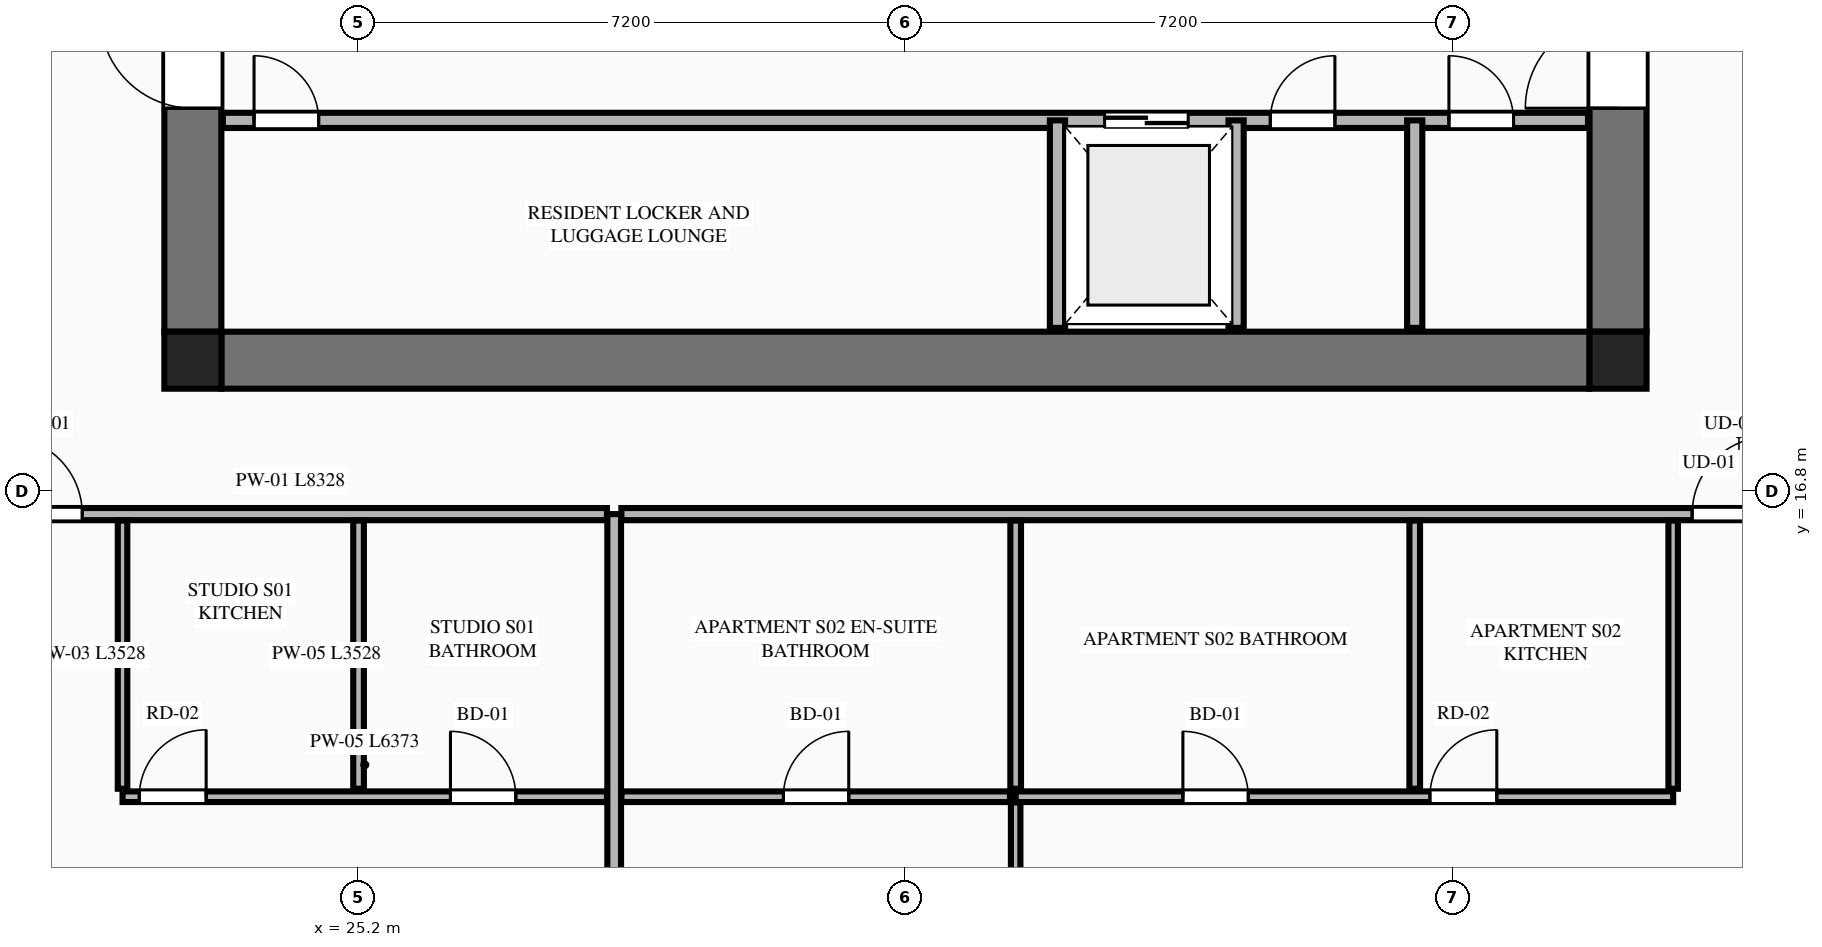
"""IFC4 building model, lengths in metres.
Left out: names, types, materials, properties, quantities, classifications, styles, units other than length and angle.
Written with IfcOpenShell. Run it as: python <this file> out.ifc"""

import sys

from ifc_helpers import new_model, si_unit, direction, frame, frame_2d, origin, origin_2d, place, context, subcontext, project, spatial, rectangle, extrude, element, fill, save


model = new_model("IFC4")
c1 = context("Model", 3, precision=1e-05, world=origin(), true_north=direction((0.0, 1.0)))
c2 = subcontext(c1, "Body", "Model", "MODEL_VIEW")
j1 = project(units=[si_unit("LENGTHUNIT", "METRE"), si_unit("PLANEANGLEUNIT", "RADIAN")], contexts=[c1])
p1 = place(None, origin())
s1 = spatial("IfcSite", under=j1, at=p1, CompositionType="ELEMENT")
p2 = place(p1, origin())
s2 = spatial("IfcBuilding", under=s1, at=p2, CompositionType="ELEMENT")
p3 = place(p2, frame((0.0, 0.0, 133.9)))
s3 = spatial("IfcBuildingStorey", under=s2, at=p3, CompositionType="ELEMENT", Elevation=133.9)
for number, where, z_axis, x_axis in (
    (1, (23.025, 18.525, 0.0), (0.0, 0.0, 1.0), (1.0, 0.0, 0.0)),
    (2, (41.775, 18.525, 0.0), (0.0, 0.0, 1.0), (1.0, 0.0, 0.0)),
):
    element("IfcColumn", number, at=place(p3, frame(where, z_axis=z_axis, x_axis=x_axis)), inside=s3, PredefinedType="COLUMN", context=c2, shape_type="SweptSolid", body=[
        extrude(rectangle(XDim=0.75, YDim=0.75, at=origin_2d()), origin(), (0.0, 0.0, 1.0), 3.55),
    ])
p4 = place(p3, frame((23.4, 18.525, 0.0), z_axis=(0.0, 0.0, 1.0), x_axis=(1.0, 0.0, 0.0)))
e3 = element("IfcWall", 3, at=p4, inside=s3, PredefinedType="SHEAR", context=c2, shape_type="SweptSolid", body=[
    extrude(rectangle(XDim=18.0, YDim=0.75, at=frame_2d((9.0, 0.0))), origin(), (0.0, 0.0, 1.0), 3.34),
])
p5 = place(p3, frame((23.025, 18.9, 0.0), z_axis=(0.0, 0.0, 1.0), x_axis=(0.0, 1.0, 0.0)))
e4 = element("IfcWall", 4, at=p5, inside=s3, PredefinedType="SHEAR", context=c2, shape_type="SweptSolid", body=[
    extrude(rectangle(XDim=14.0, YDim=0.75, at=frame_2d((7.0, 0.0))), origin(), (0.0, 0.0, 1.0), 3.34),
])
p6 = place(p5, frame((2.94, 0.0, 0.0)))
e5 = element("IfcOpeningElement", 5, at=p6, cuts=e4, PredefinedType="OPENING", context=c2, shape_type="SweptSolid", body=[
    extrude(rectangle(XDim=1.22, YDim=2.25, at=frame_2d((0.61, 1.125))), frame((0.0, 0.385, 0.0), z_axis=(0.0, -1.0, 0.0), x_axis=(1.0, 0.0, 0.0)), (0.0, 0.0, 1.0), 0.77),
])
p7 = place(p3, frame((41.775, 18.9, 0.0), z_axis=(0.0, 0.0, 1.0), x_axis=(0.0, 1.0, 0.0)))
e6 = element("IfcWall", 6, at=p7, inside=s3, PredefinedType="SHEAR", context=c2, shape_type="SweptSolid", body=[
    extrude(rectangle(XDim=14.0, YDim=0.75, at=frame_2d((7.0, 0.0))), origin(), (0.0, 0.0, 1.0), 3.34),
])
p8 = place(p7, frame((2.94, 0.0, 0.0)))
e7 = element("IfcOpeningElement", 7, at=p8, cuts=e6, PredefinedType="OPENING", context=c2, shape_type="SweptSolid", body=[
    extrude(rectangle(XDim=1.22, YDim=2.25, at=frame_2d((0.61, 1.125))), frame((0.0, 0.385, 0.0), z_axis=(0.0, -1.0, 0.0), x_axis=(1.0, 0.0, 0.0)), (0.0, 0.0, 1.0), 0.77),
])
p9 = place(p3, frame((23.42, 21.68, 0.0), z_axis=(0.0, 0.0, 1.0), x_axis=(1.0, 0.0, 0.0)))
e8 = element("IfcWall", 8, at=p9, inside=s3, PredefinedType="PLUMBINGWALL", context=c2, shape_type="SweptSolid", body=[
    extrude(rectangle(XDim=17.96, YDim=0.2, at=frame_2d((8.98, 0.0))), origin(), (0.0, 0.0, 1.0), 3.34),
])
p10 = place(p9, frame((11.6, 0.0, 0.0)))
e9 = element("IfcOpeningElement", 9, at=p10, cuts=e8, PredefinedType="OPENING", context=c2, shape_type="SweptSolid", body=[
    extrude(rectangle(XDim=1.1, YDim=2.2, at=frame_2d((0.55, 1.1))), frame((0.0, 0.11, 0.0), z_axis=(0.0, -1.0, 0.0), x_axis=(1.0, 0.0, 0.0)), (0.0, 0.0, 1.0), 0.22),
])
p11 = place(p9, frame((0.41, 0.0, 0.0)))
e10 = element("IfcOpeningElement", 10, at=p11, cuts=e8, PredefinedType="OPENING", context=c2, shape_type="SweptSolid", body=[
    extrude(rectangle(XDim=0.85, YDim=2.05, at=frame_2d((0.425, 1.025))), frame((0.0, 0.11, 0.0), z_axis=(0.0, -1.0, 0.0), x_axis=(1.0, 0.0, 0.0)), (0.0, 0.0, 1.0), 0.22),
])
p12 = place(p9, frame((13.78, 0.0, 0.0)))
e11 = element("IfcOpeningElement", 11, at=p12, cuts=e8, PredefinedType="OPENING", context=c2, shape_type="SweptSolid", body=[
    extrude(rectangle(XDim=0.85, YDim=2.05, at=frame_2d((0.425, 1.025))), frame((0.0, 0.11, 0.0), z_axis=(0.0, -1.0, 0.0), x_axis=(1.0, 0.0, 0.0)), (0.0, 0.0, 1.0), 0.22),
])
p13 = place(p9, frame((16.13, 0.0, 0.0)))
e12 = element("IfcOpeningElement", 12, at=p13, cuts=e8, PredefinedType="OPENING", context=c2, shape_type="SweptSolid", body=[
    extrude(rectangle(XDim=0.85, YDim=2.05, at=frame_2d((0.425, 1.025))), frame((0.0, 0.11, 0.0), z_axis=(0.0, -1.0, 0.0), x_axis=(1.0, 0.0, 0.0)), (0.0, 0.0, 1.0), 0.22),
])
for number, where, z_axis, x_axis in (
    (13, (34.4, 18.95, 0.0), (0.0, 0.0, 1.0), (0.0, 1.0, 0.0)),
    (14, (36.75, 18.95, 0.0), (0.0, 0.0, 1.0), (0.0, 1.0, 0.0)),
    (15, (39.1, 18.95, 0.0), (0.0, 0.0, 1.0), (0.0, 1.0, 0.0)),
):
    element("IfcWall", number, at=place(p3, frame(where, z_axis=z_axis, x_axis=x_axis)), inside=s3, PredefinedType="PLUMBINGWALL", context=c2, shape_type="SweptSolid", body=[
        extrude(rectangle(XDim=2.73, YDim=0.2, at=frame_2d((1.365, 0.0))), origin(), (0.0, 0.0, 1.0), 3.34),
    ])
p14 = place(p3, frame((28.568, 4.105, 0.0), z_axis=(0.0, 0.0, 1.0), x_axis=(0.0, 1.0, 0.0)))
e16 = element("IfcWall", 16, at=p14, inside=s3, PredefinedType="PARTITIONING", context=c2, shape_type="SweptSolid", body=[
    extrude(rectangle(XDim=12.395, YDim=0.18, at=frame_2d((6.198, 0.0))), origin(), (0.0, 0.0, 1.0), 2.722),
])
p15 = place(p3, frame((20.145, 16.5, 0.0), z_axis=(0.0, 0.0, 1.0), x_axis=(1.0, 0.0, 0.0)))
e17 = element("IfcWall", 17, at=p15, inside=s3, PredefinedType="PARTITIONING", context=c2, shape_type="SweptSolid", body=[
    extrude(rectangle(XDim=8.328, YDim=0.16, at=frame_2d((4.164, 0.0))), origin(), (0.0, 0.0, 1.0), 3.34),
])
p16 = place(p15, frame((0.405, 0.0, 0.0)))
e18 = element("IfcOpeningElement", 18, at=p16, cuts=e17, PredefinedType="OPENING", context=c2, shape_type="SweptSolid", body=[
    extrude(rectangle(XDim=1.02, YDim=2.25, at=frame_2d((0.51, 1.125))), frame((0.0, 0.09, 0.0), z_axis=(0.0, -1.0, 0.0), x_axis=(1.0, 0.0, 0.0)), (0.0, 0.0, 1.0), 0.18),
])
p17 = place(p3, frame((22.1, 12.887, 0.0), z_axis=(0.0, 0.0, 1.0), x_axis=(0.0, 1.0, 0.0)))
e19 = element("IfcWall", 19, at=p17, inside=s3, PredefinedType="PARTITIONING", context=c2, shape_type="SweptSolid", body=[
    extrude(rectangle(XDim=3.528, YDim=0.125, at=frame_2d((1.764, 0.0))), origin(), (0.0, 0.0, 1.0), 2.722),
])
p18 = place(p3, frame((22.1, 12.782, 0.0), z_axis=(0.0, 0.0, 1.0), x_axis=(1.0, 0.0, 0.0)))
e20 = element("IfcWall", 20, at=p18, inside=s3, PredefinedType="PLUMBINGWALL", context=c2, shape_type="SweptSolid", body=[
    extrude(rectangle(XDim=6.373, YDim=0.14, at=frame_2d((3.187, 0.0))), origin(), (0.0, 0.0, 1.0), 3.34),
])
p19 = place(p18, frame((4.314, 0.0, 0.0)))
e21 = element("IfcOpeningElement", 21, at=p19, cuts=e20, PredefinedType="OPENING", context=c2, shape_type="SweptSolid", body=[
    extrude(rectangle(XDim=0.86, YDim=2.1, at=frame_2d((0.43, 1.05))), frame((0.0, 0.08, 0.0), z_axis=(0.0, -1.0, 0.0), x_axis=(1.0, 0.0, 0.0)), (0.0, 0.0, 1.0), 0.16),
])
p20 = place(p18, frame((0.22, 0.0, 0.0)))
e22 = element("IfcOpeningElement", 22, at=p20, cuts=e20, PredefinedType="OPENING", context=c2, shape_type="SweptSolid", body=[
    extrude(rectangle(XDim=0.88, YDim=2.15, at=frame_2d((0.44, 1.075))), frame((0.0, 0.08, 0.0), z_axis=(0.0, -1.0, 0.0), x_axis=(1.0, 0.0, 0.0)), (0.0, 0.0, 1.0), 0.16),
])
p21 = place(p3, frame((25.205, 12.887, 0.0), z_axis=(0.0, 0.0, 1.0), x_axis=(0.0, 1.0, 0.0)))
e23 = element("IfcWall", 23, at=p21, inside=s3, PredefinedType="PLUMBINGWALL", context=c2, shape_type="SweptSolid", body=[
    extrude(rectangle(XDim=3.528, YDim=0.14, at=frame_2d((1.764, 0.0))), origin(), (0.0, 0.0, 1.0), 3.34),
])
p22 = place(p3, frame((28.663, 16.5, 0.0), z_axis=(0.0, 0.0, 1.0), x_axis=(1.0, 0.0, 0.0)))
e24 = element("IfcWall", 24, at=p22, inside=s3, PredefinedType="PARTITIONING", context=c2, shape_type="SweptSolid", body=[
    extrude(rectangle(XDim=15.992, YDim=0.16, at=frame_2d((7.996, 0.0))), origin(), (0.0, 0.0, 1.0), 3.34),
])
p23 = place(p22, frame((14.087, 0.0, 0.0)))
e25 = element("IfcOpeningElement", 25, at=p23, cuts=e24, PredefinedType="OPENING", context=c2, shape_type="SweptSolid", body=[
    extrude(rectangle(XDim=1.02, YDim=2.25, at=frame_2d((0.51, 1.125))), frame((0.0, 0.09, 0.0), z_axis=(0.0, -1.0, 0.0), x_axis=(1.0, 0.0, 0.0)), (0.0, 0.0, 1.0), 0.18),
])
p24 = place(p3, frame((42.5, 12.887, 0.0), z_axis=(0.0, 0.0, 1.0), x_axis=(0.0, 1.0, 0.0)))
e26 = element("IfcWall", 26, at=p24, inside=s3, PredefinedType="PARTITIONING", context=c2, shape_type="SweptSolid", body=[
    extrude(rectangle(XDim=3.528, YDim=0.125, at=frame_2d((1.764, 0.0))), origin(), (0.0, 0.0, 1.0), 2.722),
])
p25 = place(p3, frame((33.85, 12.782, 0.0), z_axis=(0.0, 0.0, 1.0), x_axis=(1.0, 0.0, 0.0)))
e27 = element("IfcWall", 27, at=p25, inside=s3, PredefinedType="PLUMBINGWALL", context=c2, shape_type="SweptSolid", body=[
    extrude(rectangle(XDim=8.65, YDim=0.14, at=frame_2d((4.325, 0.0))), origin(), (0.0, 0.0, 1.0), 3.34),
])
p26 = place(p25, frame((2.2, 0.0, 0.0)))
e28 = element("IfcOpeningElement", 28, at=p26, cuts=e27, PredefinedType="OPENING", context=c2, shape_type="SweptSolid", body=[
    extrude(rectangle(XDim=0.86, YDim=2.1, at=frame_2d((0.43, 1.05))), frame((0.0, 0.08, 0.0), z_axis=(0.0, -1.0, 0.0), x_axis=(1.0, 0.0, 0.0)), (0.0, 0.0, 1.0), 0.16),
])
p27 = place(p25, frame((5.45, 0.0, 0.0)))
e29 = element("IfcOpeningElement", 29, at=p27, cuts=e27, PredefinedType="OPENING", context=c2, shape_type="SweptSolid", body=[
    extrude(rectangle(XDim=0.88, YDim=2.15, at=frame_2d((0.44, 1.075))), frame((0.0, 0.08, 0.0), z_axis=(0.0, -1.0, 0.0), x_axis=(1.0, 0.0, 0.0)), (0.0, 0.0, 1.0), 0.16),
])
p28 = place(p3, frame((28.663, 12.782, 0.0), z_axis=(0.0, 0.0, 1.0), x_axis=(1.0, 0.0, 0.0)))
e30 = element("IfcWall", 30, at=p28, inside=s3, PredefinedType="PLUMBINGWALL", context=c2, shape_type="SweptSolid", body=[
    extrude(rectangle(XDim=5.112, YDim=0.14, at=frame_2d((2.556, 0.0))), origin(), (0.0, 0.0, 1.0), 3.34),
])
p29 = place(p28, frame((2.131, 0.0, 0.0)))
e31 = element("IfcOpeningElement", 31, at=p29, cuts=e30, PredefinedType="OPENING", context=c2, shape_type="SweptSolid", body=[
    extrude(rectangle(XDim=0.86, YDim=2.1, at=frame_2d((0.43, 1.05))), frame((0.0, 0.08, 0.0), z_axis=(0.0, -1.0, 0.0), x_axis=(1.0, 0.0, 0.0)), (0.0, 0.0, 1.0), 0.16),
])
for number, where, z_axis, x_axis in (
    (32, (39.1, 12.887, 0.0), (0.0, 0.0, 1.0), (0.0, 1.0, 0.0)),
    (33, (33.85, 12.887, 0.0), (0.0, 0.0, 1.0), (0.0, 1.0, 0.0)),
):
    element("IfcWall", number, at=place(p3, frame(where, z_axis=z_axis, x_axis=x_axis)), inside=s3, PredefinedType="PLUMBINGWALL", context=c2, shape_type="SweptSolid", body=[
        extrude(rectangle(XDim=3.528, YDim=0.14, at=frame_2d((1.764, 0.0))), origin(), (0.0, 0.0, 1.0), 3.34),
    ])
p30 = place(p3, frame((33.85, 4.015, 0.0), z_axis=(0.0, 0.0, 1.0), x_axis=(0.0, 1.0, 0.0)))
e34 = element("IfcWall", 34, at=p30, inside=s3, PredefinedType="PARTITIONING", context=c2, shape_type="SweptSolid", body=[
    extrude(rectangle(XDim=8.692, YDim=0.125, at=frame_2d((4.346, 0.0))), origin(), (0.0, 0.0, 1.0), 3.34),
])
p31 = place(p30, frame((0.35, 0.0, 0.0)))
e35 = element("IfcOpeningElement", 35, at=p31, cuts=e34, PredefinedType="OPENING", context=c2, shape_type="SweptSolid", body=[
    extrude(rectangle(XDim=0.92, YDim=2.15, at=frame_2d((0.46, 1.075))), frame((0.0, 0.073, 0.0), z_axis=(0.0, -1.0, 0.0), x_axis=(1.0, 0.0, 0.0)), (0.0, 0.0, 1.0), 0.145),
])
p32 = place(p6, origin())
e36 = element("IfcDoor", 36, at=p32, inside=s3, OperationType="SINGLE_SWING_RIGHT", PredefinedType="DOOR", context=c2, shape_type="SweptSolid", body=[
    extrude(rectangle(XDim=1.22, YDim=2.25, at=frame_2d((0.61, 1.125))), frame((0.0, 0.025, 0.0), z_axis=(0.0, -1.0, 0.0), x_axis=(1.0, 0.0, 0.0)), (0.0, 0.0, 1.0), 0.05),
])
fill(e5, e36)
p33 = place(p8, origin())
e37 = element("IfcDoor", 37, at=p33, inside=s3, OperationType="SINGLE_SWING_LEFT", PredefinedType="DOOR", context=c2, shape_type="SweptSolid", body=[
    extrude(rectangle(XDim=1.22, YDim=2.25, at=frame_2d((0.61, 1.125))), frame((0.0, 0.025, 0.0), z_axis=(0.0, -1.0, 0.0), x_axis=(1.0, 0.0, 0.0)), (0.0, 0.0, 1.0), 0.05),
])
fill(e7, e37)
p34 = place(p10, origin())
e38 = element("IfcDoor", 38, at=p34, inside=s3, OperationType="DOUBLE_DOOR_SLIDING", PredefinedType="DOOR", context=c2, shape_type="SweptSolid", body=[
    extrude(rectangle(XDim=1.1, YDim=2.2, at=frame_2d((0.55, 1.1))), frame((0.0, 0.025, 0.0), z_axis=(0.0, -1.0, 0.0), x_axis=(1.0, 0.0, 0.0)), (0.0, 0.0, 1.0), 0.05),
])
fill(e9, e38)
p35 = place(p11, origin())
e39 = element("IfcDoor", 39, at=p35, inside=s3, OperationType="SINGLE_SWING_LEFT", PredefinedType="DOOR", context=c2, shape_type="SweptSolid", body=[
    extrude(rectangle(XDim=0.85, YDim=2.05, at=frame_2d((0.425, 1.025))), frame((0.0, 0.025, 0.0), z_axis=(0.0, -1.0, 0.0), x_axis=(1.0, 0.0, 0.0)), (0.0, 0.0, 1.0), 0.05),
])
fill(e10, e39)
p36 = place(p12, origin())
e40 = element("IfcDoor", 40, at=p36, inside=s3, OperationType="SINGLE_SWING_RIGHT", PredefinedType="DOOR", context=c2, shape_type="SweptSolid", body=[
    extrude(rectangle(XDim=0.85, YDim=2.05, at=frame_2d((0.425, 1.025))), frame((0.0, 0.025, 0.0), z_axis=(0.0, -1.0, 0.0), x_axis=(1.0, 0.0, 0.0)), (0.0, 0.0, 1.0), 0.05),
])
fill(e11, e40)
p37 = place(p13, origin())
e41 = element("IfcDoor", 41, at=p37, inside=s3, OperationType="SINGLE_SWING_LEFT", PredefinedType="DOOR", context=c2, shape_type="SweptSolid", body=[
    extrude(rectangle(XDim=0.85, YDim=2.05, at=frame_2d((0.425, 1.025))), frame((0.0, 0.025, 0.0), z_axis=(0.0, -1.0, 0.0), x_axis=(1.0, 0.0, 0.0)), (0.0, 0.0, 1.0), 0.05),
])
fill(e12, e41)
p38 = place(p19, origin())
e42 = element("IfcDoor", 42, at=p38, inside=s3, OperationType="SINGLE_SWING_LEFT", PredefinedType="DOOR", context=c2, shape_type="SweptSolid", body=[
    extrude(rectangle(XDim=0.86, YDim=2.1, at=frame_2d((0.43, 1.05))), frame((0.0, 0.025, 0.0), z_axis=(0.0, -1.0, 0.0), x_axis=(1.0, 0.0, 0.0)), (0.0, 0.0, 1.0), 0.05),
])
fill(e21, e42)
p39 = place(p16, origin())
e43 = element("IfcDoor", 43, at=p39, inside=s3, OperationType="SINGLE_SWING_LEFT", PredefinedType="DOOR", context=c2, shape_type="SweptSolid", body=[
    extrude(rectangle(XDim=1.02, YDim=2.25, at=frame_2d((0.51, 1.125))), frame((0.0, 0.025, 0.0), z_axis=(0.0, -1.0, 0.0), x_axis=(1.0, 0.0, 0.0)), (0.0, 0.0, 1.0), 0.05),
])
fill(e18, e43)
p40 = place(p20, origin())
e44 = element("IfcDoor", 44, at=p40, inside=s3, OperationType="SINGLE_SWING_RIGHT", PredefinedType="DOOR", context=c2, shape_type="SweptSolid", body=[
    extrude(rectangle(XDim=0.88, YDim=2.15, at=frame_2d((0.44, 1.075))), frame((0.0, 0.025, 0.0), z_axis=(0.0, -1.0, 0.0), x_axis=(1.0, 0.0, 0.0)), (0.0, 0.0, 1.0), 0.05),
])
fill(e22, e44)
p41 = place(p26, origin())
e45 = element("IfcDoor", 45, at=p41, inside=s3, OperationType="SINGLE_SWING_LEFT", PredefinedType="DOOR", context=c2, shape_type="SweptSolid", body=[
    extrude(rectangle(XDim=0.86, YDim=2.1, at=frame_2d((0.43, 1.05))), frame((0.0, 0.025, 0.0), z_axis=(0.0, -1.0, 0.0), x_axis=(1.0, 0.0, 0.0)), (0.0, 0.0, 1.0), 0.05),
])
fill(e28, e45)
p42 = place(p29, origin())
e46 = element("IfcDoor", 46, at=p42, inside=s3, OperationType="SINGLE_SWING_RIGHT", PredefinedType="DOOR", context=c2, shape_type="SweptSolid", body=[
    extrude(rectangle(XDim=0.86, YDim=2.1, at=frame_2d((0.43, 1.05))), frame((0.0, 0.025, 0.0), z_axis=(0.0, -1.0, 0.0), x_axis=(1.0, 0.0, 0.0)), (0.0, 0.0, 1.0), 0.05),
])
fill(e31, e46)
p43 = place(p23, origin())
e47 = element("IfcDoor", 47, at=p43, inside=s3, OperationType="SINGLE_SWING_RIGHT", PredefinedType="DOOR", context=c2, shape_type="SweptSolid", body=[
    extrude(rectangle(XDim=1.02, YDim=2.25, at=frame_2d((0.51, 1.125))), frame((0.0, 0.025, 0.0), z_axis=(0.0, -1.0, 0.0), x_axis=(1.0, 0.0, 0.0)), (0.0, 0.0, 1.0), 0.05),
])
fill(e25, e47)
p44 = place(p27, origin())
e48 = element("IfcDoor", 48, at=p44, inside=s3, OperationType="SINGLE_SWING_RIGHT", PredefinedType="DOOR", context=c2, shape_type="SweptSolid", body=[
    extrude(rectangle(XDim=0.88, YDim=2.15, at=frame_2d((0.44, 1.075))), frame((0.0, 0.025, 0.0), z_axis=(0.0, -1.0, 0.0), x_axis=(1.0, 0.0, 0.0)), (0.0, 0.0, 1.0), 0.05),
])
fill(e29, e48)
save(model, sys.argv[1])
